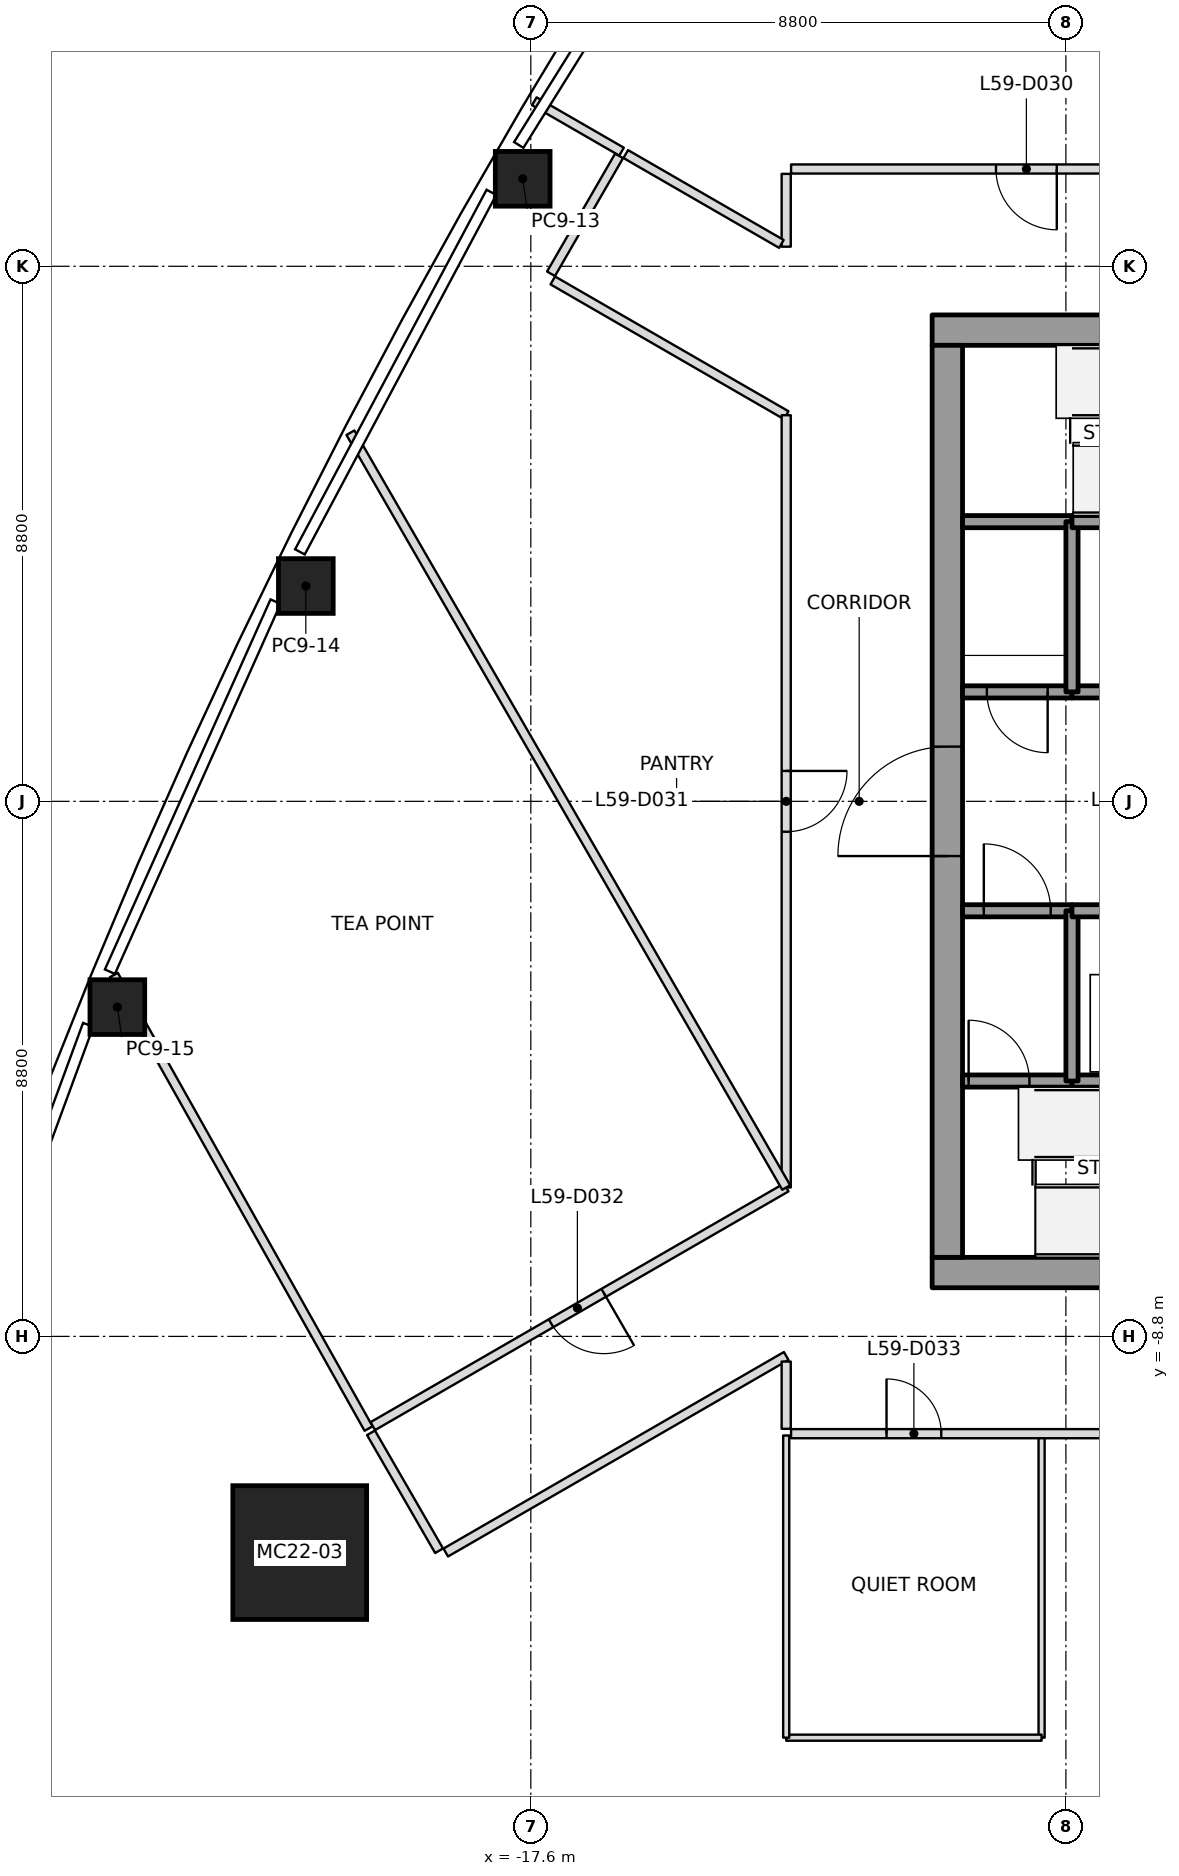
"""IFC4 building model, lengths in metres.
Left out: names, types, materials, properties, quantities, classifications, styles, units other than length and angle.
Written with IfcOpenShell. Run it as: python <this file> out.ifc"""

import sys

from ifc_helpers import new_model, si_unit, direction, frame, frame_2d, origin, origin_2d, place, context, subcontext, project, spatial, rectangle, extrude, element, fill, save


model = new_model("IFC4")
c1 = context("Model", 3, precision=1e-05, world=origin(), true_north=direction((0.0, 1.0)))
c2 = subcontext(c1, "Body", "Model", "MODEL_VIEW")
j1 = project(units=[si_unit("LENGTHUNIT", "METRE"), si_unit("PLANEANGLEUNIT", "RADIAN")], contexts=[c1])
p1 = place(None, origin())
s1 = spatial("IfcSite", under=j1, at=p1, CompositionType="ELEMENT")
p2 = place(p1, origin())
s2 = spatial("IfcBuilding", under=s1, at=p2, CompositionType="ELEMENT")
p3 = place(p2, frame((0.0, 0.0, 263.0)))
s3 = spatial("IfcBuildingStorey", under=s2, at=p3, CompositionType="ELEMENT", Elevation=263.0)
p4 = place(p3, frame((-21.4, -12.356, 0.0), z_axis=(0.027756693063, 0.016104982348, 0.999484965136), x_axis=(0.99961470877, -0.000447193351, -0.02775309042)))
e1 = element("IfcColumn", 1, at=p4, inside=s3, PredefinedType="COLUMN", context=c2, shape_type="SweptSolid", body=[
    extrude(rectangle(XDim=2.2, YDim=2.2, at=origin_2d()), origin(), (0.0, 0.0, 1.0), 4.002),
])
p5 = place(p3, frame((-17.734, 10.239, 0.0), z_axis=(0.009887052741, -0.005675900648, 0.999935013058), x_axis=(0.49997556095, 0.866039512773, -2.7732311e-05)))
e2 = element("IfcColumn", 2, at=p5, inside=s3, PredefinedType="COLUMN", context=c2, shape_type="SweptSolid", body=[
    extrude(rectangle(XDim=0.9, YDim=0.9, at=origin_2d()), origin(), (0.0, 0.0, 1.0), 4.0),
])
p6 = place(p3, frame((-21.3, 3.541, 0.0), z_axis=(0.014036674448, 0.002013957638, 0.999899452818), x_axis=(0.439491445478, 0.898211338571, -0.00797876017)))
e3 = element("IfcColumn", 3, at=p6, inside=s3, PredefinedType="COLUMN", context=c2, shape_type="SweptSolid", body=[
    extrude(rectangle(XDim=0.9, YDim=0.9, at=origin_2d()), origin(), (0.0, 0.0, 1.0), 4.0),
])
p7 = place(p3, frame((-24.4, -3.385, 0.0), z_axis=(0.017757540332, 0.01000768596, 0.999792236409), x_axis=(0.376945742216, 0.926097740454, -0.015965041529)))
e4 = element("IfcColumn", 4, at=p7, inside=s3, PredefinedType="COLUMN", context=c2, shape_type="SweptSolid", body=[
    extrude(rectangle(XDim=0.9, YDim=0.9, at=origin_2d()), origin(), (0.0, 0.0, 1.0), 4.001),
])
p8 = place(p3, frame((-11.0, -7.75, 0.0), z_axis=(0.0, 0.0, 1.0), x_axis=(1.0, 0.0, 0.0)))
e5 = element("IfcWall", 5, at=p8, inside=s3, PredefinedType="SHEAR", context=c2, shape_type="SweptSolid", body=[
    extrude(rectangle(XDim=22.0, YDim=0.5, at=frame_2d((11.0, 0.0))), origin(), (0.0, 0.0, 1.0), 4.0),
])
p9 = place(p8, frame((10.45, 0.0, 0.0)))
e6 = element("IfcOpeningElement", 6, at=p9, cuts=e5, PredefinedType="OPENING", context=c2, shape_type="SweptSolid", body=[
    extrude(rectangle(XDim=1.1, YDim=2.1, at=frame_2d((0.55, 1.05))), frame((0.0, 0.25, 0.0), z_axis=(0.0, -1.0, 0.0), x_axis=(1.0, 0.0, 0.0)), (0.0, 0.0, 1.0), 0.5),
])
p10 = place(p3, frame((-11.0, 7.75, 0.0), z_axis=(0.0, 0.0, 1.0), x_axis=(1.0, 0.0, 0.0)))
e7 = element("IfcWall", 7, at=p10, inside=s3, PredefinedType="SHEAR", context=c2, shape_type="SweptSolid", body=[
    extrude(rectangle(XDim=22.0, YDim=0.5, at=frame_2d((11.0, 0.0))), origin(), (0.0, 0.0, 1.0), 4.0),
])
p11 = place(p10, frame((10.45, 0.0, 0.0)))
e8 = element("IfcOpeningElement", 8, at=p11, cuts=e7, PredefinedType="OPENING", context=c2, shape_type="SweptSolid", body=[
    extrude(rectangle(XDim=1.1, YDim=2.1, at=frame_2d((0.55, 1.05))), frame((0.0, 0.25, 0.0), z_axis=(0.0, -1.0, 0.0), x_axis=(1.0, 0.0, 0.0)), (0.0, 0.0, 1.0), 0.5),
])
p12 = place(p3, frame((-10.75, -7.5, 0.0), z_axis=(0.0, 0.0, 1.0), x_axis=(0.0, 1.0, 0.0)))
e9 = element("IfcWall", 9, at=p12, inside=s3, PredefinedType="SHEAR", context=c2, shape_type="SweptSolid", body=[
    extrude(rectangle(XDim=15.0, YDim=0.5, at=frame_2d((7.5, 0.0))), origin(), (0.0, 0.0, 1.0), 4.0),
])
p13 = place(p12, frame((6.6, 0.0, 0.0)))
e10 = element("IfcOpeningElement", 10, at=p13, cuts=e9, PredefinedType="OPENING", context=c2, shape_type="SweptSolid", body=[
    extrude(rectangle(XDim=1.8, YDim=2.1, at=frame_2d((0.9, 1.05))), frame((0.0, 0.25, 0.0), z_axis=(0.0, -1.0, 0.0), x_axis=(1.0, 0.0, 0.0)), (0.0, 0.0, 1.0), 0.5),
])
p14 = place(p3, frame((-10.5, -4.6, 0.0), z_axis=(0.0, 0.0, 1.0), x_axis=(1.0, 0.0, 0.0)))
e11 = element("IfcWall", 11, at=p14, inside=s3, PredefinedType="SOLIDWALL", context=c2, shape_type="SweptSolid", body=[
    extrude(rectangle(XDim=1.8, YDim=0.2, at=frame_2d((0.9, 0.0))), origin(), (0.0, 0.0, 1.0), 3.85),
])
p15 = place(p14, frame((0.1, 0.0, 0.0)))
e12 = element("IfcOpeningElement", 12, at=p15, cuts=e11, PredefinedType="OPENING", context=c2, shape_type="SweptSolid", body=[
    extrude(rectangle(XDim=1.0, YDim=2.1, at=frame_2d((0.5, 1.05))), frame((0.0, 0.1, 0.0), z_axis=(0.0, -1.0, 0.0), x_axis=(1.0, 0.0, 0.0)), (0.0, 0.0, 1.0), 0.2),
])
p16 = place(p3, frame((-10.5, -1.8, 0.0), z_axis=(0.0, 0.0, 1.0), x_axis=(1.0, 0.0, 0.0)))
e13 = element("IfcWall", 13, at=p16, inside=s3, PredefinedType="SOLIDWALL", context=c2, shape_type="SweptSolid", body=[
    extrude(rectangle(XDim=1.8, YDim=0.2, at=frame_2d((0.9, 0.0))), origin(), (0.0, 0.0, 1.0), 3.85),
])
p17 = place(p16, frame((0.35, 0.0, 0.0)))
e14 = element("IfcOpeningElement", 14, at=p17, cuts=e13, PredefinedType="OPENING", context=c2, shape_type="SweptSolid", body=[
    extrude(rectangle(XDim=1.1, YDim=2.1, at=frame_2d((0.55, 1.05))), frame((0.0, 0.1, 0.0), z_axis=(0.0, -1.0, 0.0), x_axis=(1.0, 0.0, 0.0)), (0.0, 0.0, 1.0), 0.2),
])
p18 = place(p3, frame((-8.7, 1.8, 0.0), z_axis=(0.0, 0.0, 1.0), x_axis=(-1.0, 0.0, 0.0)))
e15 = element("IfcWall", 15, at=p18, inside=s3, PredefinedType="SOLIDWALL", context=c2, shape_type="SweptSolid", body=[
    extrude(rectangle(XDim=1.8, YDim=0.2, at=frame_2d((0.9, 0.0))), origin(), (0.0, 0.0, 1.0), 3.85),
])
p19 = place(p18, frame((0.4, 0.0, 0.0)))
e16 = element("IfcOpeningElement", 16, at=p19, cuts=e15, PredefinedType="OPENING", context=c2, shape_type="SweptSolid", body=[
    extrude(rectangle(XDim=1.0, YDim=2.1, at=frame_2d((0.5, 1.05))), frame((0.0, 0.1, 0.0), z_axis=(0.0, -1.0, 0.0), x_axis=(1.0, 0.0, 0.0)), (0.0, 0.0, 1.0), 0.2),
])
p20 = place(p3, frame((-8.7, 4.6, 0.0), z_axis=(0.0, 0.0, 1.0), x_axis=(-1.0, 0.0, 0.0)))
e17 = element("IfcWall", 17, at=p20, inside=s3, PredefinedType="SOLIDWALL", context=c2, shape_type="SweptSolid", body=[
    extrude(rectangle(XDim=1.8, YDim=0.2, at=frame_2d((0.9, 0.0))), origin(), (0.0, 0.0, 1.0), 3.85),
])
p21 = place(p3, frame((-8.7, -4.6, 0.0), z_axis=(0.0, 0.0, 1.0), x_axis=(1.0, 0.0, 0.0)))
e18 = element("IfcWall", 18, at=p21, inside=s3, PredefinedType="SOLIDWALL", context=c2, shape_type="SweptSolid", body=[
    extrude(rectangle(XDim=2.6, YDim=0.2, at=frame_2d((1.3, 0.0))), origin(), (0.0, 0.0, 1.0), 3.85),
])
p22 = place(p3, frame((-8.7, -4.6, 0.0), z_axis=(0.0, 0.0, 1.0), x_axis=(0.0, 1.0, 0.0)))
e19 = element("IfcWall", 19, at=p22, inside=s3, PredefinedType="SOLIDWALL", context=c2, shape_type="SweptSolid", body=[
    extrude(rectangle(XDim=2.8, YDim=0.2, at=frame_2d((1.4, 0.0))), origin(), (0.0, 0.0, 1.0), 3.85),
])
p23 = place(p3, frame((-8.7, -1.8, 0.0), z_axis=(0.0, 0.0, 1.0), x_axis=(1.0, 0.0, 0.0)))
e20 = element("IfcWall", 20, at=p23, inside=s3, PredefinedType="SOLIDWALL", context=c2, shape_type="SweptSolid", body=[
    extrude(rectangle(XDim=2.6, YDim=0.2, at=frame_2d((1.3, 0.0))), origin(), (0.0, 0.0, 1.0), 3.85),
])
p24 = place(p23, frame((0.75, 0.0, 0.0)))
e21 = element("IfcOpeningElement", 21, at=p24, cuts=e20, PredefinedType="OPENING", context=c2, shape_type="SweptSolid", body=[
    extrude(rectangle(XDim=1.1, YDim=2.1, at=frame_2d((0.55, 1.05))), frame((0.0, 0.1, 0.0), z_axis=(0.0, -1.0, 0.0), x_axis=(1.0, 0.0, 0.0)), (0.0, 0.0, 1.0), 0.2),
])
p25 = place(p3, frame((-8.7, 1.8, 0.0), z_axis=(0.0, 0.0, 1.0), x_axis=(1.0, 0.0, 0.0)))
e22 = element("IfcWall", 22, at=p25, inside=s3, PredefinedType="SOLIDWALL", context=c2, shape_type="SweptSolid", body=[
    extrude(rectangle(XDim=5.2, YDim=0.2, at=frame_2d((2.6, 0.0))), origin(), (0.0, 0.0, 1.0), 3.85),
])
p26 = place(p25, frame((2.15, 0.0, 0.0)))
e23 = element("IfcOpeningElement", 23, at=p26, cuts=e22, PredefinedType="OPENING", context=c2, shape_type="SweptSolid", body=[
    extrude(rectangle(XDim=0.9, YDim=2.1, at=frame_2d((0.45, 1.05))), frame((0.0, 0.1, 0.0), z_axis=(0.0, -1.0, 0.0), x_axis=(1.0, 0.0, 0.0)), (0.0, 0.0, 1.0), 0.2),
])
p27 = place(p3, frame((-8.7, 4.6, 0.0), z_axis=(0.0, 0.0, 1.0), x_axis=(0.0, -1.0, 0.0)))
e24 = element("IfcWall", 24, at=p27, inside=s3, PredefinedType="SOLIDWALL", context=c2, shape_type="SweptSolid", body=[
    extrude(rectangle(XDim=2.8, YDim=0.2, at=frame_2d((1.4, 0.0))), origin(), (0.0, 0.0, 1.0), 3.85),
])
p28 = place(p3, frame((-4.3, 4.6, 0.0), z_axis=(0.0, 0.0, 1.0), x_axis=(-1.0, 0.0, 0.0)))
e25 = element("IfcWall", 25, at=p28, inside=s3, PredefinedType="SOLIDWALL", context=c2, shape_type="SweptSolid", body=[
    extrude(rectangle(XDim=4.4, YDim=0.2, at=frame_2d((2.2, 0.0))), origin(), (0.0, 0.0, 1.0), 3.85),
])
p29 = place(p3, frame((-20.268, -10.316, 0.0), z_axis=(0.0, 0.0, 1.0), x_axis=(-0.489669112998, 0.871908343678, 0.0)))
e26 = element("IfcWall", 26, at=p29, inside=s3, PredefinedType="PARTITIONING", context=c2, shape_type="SweptSolid", body=[
    extrude(rectangle(XDim=8.556, YDim=0.15, at=frame_2d((4.278, 0.0))), origin(), (0.0, 0.0, 1.0), 3.443),
])
p30 = place(p3, frame((-13.4, -6.351, 0.0), z_axis=(0.0, 0.0, 1.0), x_axis=(-0.500007991186, 0.866020790022, 0.0)))
e27 = element("IfcWall", 27, at=p30, inside=s3, PredefinedType="PARTITIONING", context=c2, shape_type="SweptSolid", body=[
    extrude(rectangle(XDim=14.334, YDim=0.15, at=frame_2d((7.167, 0.0))), origin(), (0.0, 0.0, 1.0), 3.234),
])
p31 = place(p3, frame((-16.108, 10.686, 0.0), z_axis=(0.0, 0.0, 1.0), x_axis=(-0.866057962423, 0.499943602543, 0.0)))
e28 = element("IfcWall", 28, at=p31, inside=s3, PredefinedType="PARTITIONING", context=c2, shape_type="SweptSolid", body=[
    extrude(rectangle(XDim=1.656, YDim=0.15, at=frame_2d((0.828, 0.0))), origin(), (0.0, 0.0, 1.0), 3.234),
])
p32 = place(p3, frame((-20.229, -10.385, 0.0), z_axis=(0.0, 0.0, 1.0), x_axis=(0.500030632641, -0.866007717299, 0.0)))
e29 = element("IfcWall", 29, at=p32, inside=s3, PredefinedType="PARTITIONING", context=c2, shape_type="SweptSolid", body=[
    extrude(rectangle(XDim=2.24, YDim=0.15, at=frame_2d((1.12, 0.0))), origin(), (0.0, 0.0, 1.0), 3.233),
])
p33 = place(p3, frame((-13.4, -6.351, 0.0), z_axis=(0.0, 0.0, 1.0), x_axis=(-0.866028164062, -0.499995219029, 0.0)))
e30 = element("IfcWall", 30, at=p33, inside=s3, PredefinedType="PARTITIONING", context=c2, shape_type="SweptSolid", body=[
    extrude(rectangle(XDim=7.851, YDim=0.15, at=frame_2d((3.926, 0.0))), origin(), (0.0, 0.0, 1.0), 3.317),
])
p34 = place(p33, frame((3.466, 0.0, 0.0)))
e31 = element("IfcOpeningElement", 31, at=p34, cuts=e30, PredefinedType="OPENING", context=c2, shape_type="SweptSolid", body=[
    extrude(rectangle(XDim=1.0, YDim=2.1, at=frame_2d((0.5, 1.05))), frame((0.0, 0.075, 0.0), z_axis=(0.0, -1.0, 0.0), x_axis=(1.0, 0.0, 0.0)), (0.0, 0.0, 1.0), 0.15),
])
p35 = place(p3, frame((-18.999, -12.355, 0.0), z_axis=(0.0, 0.0, 1.0), x_axis=(0.866024603775, 0.500001385654, 0.0)))
e32 = element("IfcWall", 32, at=p35, inside=s3, PredefinedType="PARTITIONING", context=c2, shape_type="SweptSolid", body=[
    extrude(rectangle(XDim=6.465, YDim=0.15, at=frame_2d((3.233, 0.0))), origin(), (0.0, 0.0, 1.0), 3.233),
])
p36 = place(p3, frame((-13.4, -9.214, 0.0), z_axis=(0.0, 0.0, 1.0), x_axis=(0.0, -1.0, 0.0)))
e33 = element("IfcWall", 33, at=p36, inside=s3, PredefinedType="PARTITIONING", context=c2, shape_type="SweptSolid", body=[
    extrude(rectangle(XDim=1.106, YDim=0.15, at=frame_2d((0.553, 0.0))), origin(), (0.0, 0.0, 1.0), 3.233),
])
p37 = place(p3, frame((-16.148, 10.616, 0.0), z_axis=(0.0, 0.0, 1.0), x_axis=(-0.500077830873, -0.865980463445, 0.0)))
e34 = element("IfcWall", 34, at=p37, inside=s3, PredefinedType="PARTITIONING", context=c2, shape_type="SweptSolid", body=[
    extrude(rectangle(XDim=2.24, YDim=0.15, at=frame_2d((1.12, 0.0))), origin(), (0.0, 0.0, 1.0), 3.45),
])
p38 = place(p3, frame((-17.239, 8.567, 0.0), z_axis=(0.0, 0.0, 1.0), x_axis=(0.866031500321, -0.49998944034, 0.0)))
e35 = element("IfcWall", 35, at=p38, inside=s3, PredefinedType="PARTITIONING", context=c2, shape_type="SweptSolid", body=[
    extrude(rectangle(XDim=4.433, YDim=0.15, at=frame_2d((2.216, 0.0))), origin(), (0.0, 0.0, 1.0), 3.45),
])
p39 = place(p3, frame((-13.4, 6.351, 0.0), z_axis=(0.0, 0.0, 1.0), x_axis=(0.0, -1.0, 0.0)))
e36 = element("IfcWall", 36, at=p39, inside=s3, PredefinedType="PARTITIONING", context=c2, shape_type="SweptSolid", body=[
    extrude(rectangle(XDim=12.702, YDim=0.15, at=frame_2d((6.351, 0.0))), origin(), (0.0, 0.0, 1.0), 3.317),
])
p40 = place(p39, frame((5.851, 0.0, 0.0)))
e37 = element("IfcOpeningElement", 37, at=p40, cuts=e36, PredefinedType="OPENING", context=c2, shape_type="SweptSolid", body=[
    extrude(rectangle(XDim=1.0, YDim=2.1, at=frame_2d((0.5, 1.05))), frame((0.0, 0.075, 0.0), z_axis=(0.0, -1.0, 0.0), x_axis=(1.0, 0.0, 0.0)), (0.0, 0.0, 1.0), 0.15),
])
p41 = place(p3, frame((-13.4, 10.32, 0.0), z_axis=(0.0, 0.0, 1.0), x_axis=(0.0, -1.0, 0.0)))
e38 = element("IfcWall", 38, at=p41, inside=s3, PredefinedType="PARTITIONING", context=c2, shape_type="SweptSolid", body=[
    extrude(rectangle(XDim=1.198, YDim=0.15, at=frame_2d((0.599, 0.0))), origin(), (0.0, 0.0, 1.0), 3.45),
])
p42 = place(p3, frame((-13.479, 9.168, 0.0), z_axis=(0.0, 0.0, 1.0), x_axis=(-0.866059033742, 0.499941746681, 0.0)))
e39 = element("IfcWall", 39, at=p42, inside=s3, PredefinedType="PARTITIONING", context=c2, shape_type="SweptSolid", body=[
    extrude(rectangle(XDim=2.955, YDim=0.15, at=frame_2d((1.478, 0.0))), origin(), (0.0, 0.0, 1.0), 3.45),
])
p43 = place(p3, frame((-13.32, -10.4, 0.0), z_axis=(0.0, 0.0, 1.0), x_axis=(1.0, 0.0, 0.0)))
e40 = element("IfcWall", 40, at=p43, inside=s3, PredefinedType="PARTITIONING", context=c2, shape_type="SweptSolid", body=[
    extrude(rectangle(XDim=12.12, YDim=0.15, at=frame_2d((6.06, 0.0))), origin(), (0.0, 0.0, 1.0), 3.317),
])
p44 = place(p43, frame((1.57, 0.0, 0.0)))
e41 = element("IfcOpeningElement", 41, at=p44, cuts=e40, PredefinedType="OPENING", context=c2, shape_type="SweptSolid", body=[
    extrude(rectangle(XDim=0.9, YDim=2.1, at=frame_2d((0.45, 1.05))), frame((0.0, 0.075, 0.0), z_axis=(0.0, -1.0, 0.0), x_axis=(1.0, 0.0, 0.0)), (0.0, 0.0, 1.0), 0.15),
])
p45 = place(p43, frame((7.67, 0.0, 0.0)))
e42 = element("IfcOpeningElement", 42, at=p45, cuts=e40, PredefinedType="OPENING", context=c2, shape_type="SweptSolid", body=[
    extrude(rectangle(XDim=1.0, YDim=2.1, at=frame_2d((0.5, 1.05))), frame((0.0, 0.075, 0.0), z_axis=(0.0, -1.0, 0.0), x_axis=(1.0, 0.0, 0.0)), (0.0, 0.0, 1.0), 0.15),
])
p46 = place(p3, frame((-4.48, 10.4, 0.0), z_axis=(0.0, 0.0, 1.0), x_axis=(-1.0, 0.0, 0.0)))
e43 = element("IfcWall", 43, at=p46, inside=s3, PredefinedType="PARTITIONING", context=c2, shape_type="SweptSolid", body=[
    extrude(rectangle(XDim=8.84, YDim=0.15, at=frame_2d((4.42, 0.0))), origin(), (0.0, 0.0, 1.0), 3.443),
])
p47 = place(p46, frame((4.47, 0.0, 0.0)))
e44 = element("IfcOpeningElement", 44, at=p47, cuts=e43, PredefinedType="OPENING", context=c2, shape_type="SweptSolid", body=[
    extrude(rectangle(XDim=1.0, YDim=2.1, at=frame_2d((0.5, 1.05))), frame((0.0, 0.075, 0.0), z_axis=(0.0, -1.0, 0.0), x_axis=(1.0, 0.0, 0.0)), (0.0, 0.0, 1.0), 0.15),
])
p48 = place(p3, frame((-9.2, -10.43, 0.0), z_axis=(0.0, 0.0, 1.0), x_axis=(0.0, -1.0, 0.0)))
e45 = element("IfcWall", 45, at=p48, inside=s3, PredefinedType="PARTITIONING", context=c2, shape_type="SweptSolid", body=[
    extrude(rectangle(XDim=4.97, YDim=0.1, at=frame_2d((2.485, 0.0))), origin(), (0.0, 0.0, 1.0), 3.45),
])
p49 = place(p3, frame((-9.2, -15.4, 0.0), z_axis=(0.0, 0.0, 1.0), x_axis=(-1.0, 0.0, 0.0)))
e46 = element("IfcWall", 46, at=p49, inside=s3, PredefinedType="PARTITIONING", context=c2, shape_type="SweptSolid", body=[
    extrude(rectangle(XDim=4.2, YDim=0.1, at=frame_2d((2.1, 0.0))), origin(), (0.0, 0.0, 1.0), 3.393),
])
p50 = place(p3, frame((-13.4, -15.4, 0.0), z_axis=(0.0, 0.0, 1.0), x_axis=(0.0, 1.0, 0.0)))
e47 = element("IfcWall", 47, at=p50, inside=s3, PredefinedType="PARTITIONING", context=c2, shape_type="SweptSolid", body=[
    extrude(rectangle(XDim=4.97, YDim=0.1, at=frame_2d((2.485, 0.0))), origin(), (0.0, 0.0, 1.0), 3.45),
])
p51 = place(p47, origin())
e48 = element("IfcDoor", 48, at=p51, inside=s3, OperationType="SINGLE_SWING_RIGHT", PredefinedType="DOOR", context=c2, shape_type="SweptSolid", body=[
    extrude(rectangle(XDim=1.0, YDim=2.1, at=frame_2d((0.5, 1.05))), frame((0.0, 0.025, 0.0), z_axis=(0.0, -1.0, 0.0), x_axis=(1.0, 0.0, 0.0)), (0.0, 0.0, 1.0), 0.05),
])
fill(e44, e48)
p52 = place(p40, origin())
e49 = element("IfcDoor", 49, at=p52, inside=s3, OperationType="SINGLE_SWING_LEFT", PredefinedType="DOOR", context=c2, shape_type="SweptSolid", body=[
    extrude(rectangle(XDim=1.0, YDim=2.1, at=frame_2d((0.5, 1.05))), frame((0.0, 0.025, 0.0), z_axis=(0.0, -1.0, 0.0), x_axis=(1.0, 0.0, 0.0)), (0.0, 0.0, 1.0), 0.05),
])
fill(e37, e49)
p53 = place(p34, origin())
e50 = element("IfcDoor", 50, at=p53, inside=s3, OperationType="SINGLE_SWING_RIGHT", PredefinedType="DOOR", context=c2, shape_type="SweptSolid", body=[
    extrude(rectangle(XDim=1.0, YDim=2.1, at=frame_2d((0.5, 1.05))), frame((0.0, 0.025, 0.0), z_axis=(0.0, -1.0, 0.0), x_axis=(1.0, 0.0, 0.0)), (0.0, 0.0, 1.0), 0.05),
])
fill(e31, e50)
p54 = place(p44, origin())
e51 = element("IfcDoor", 51, at=p54, inside=s3, OperationType="SINGLE_SWING_LEFT", PredefinedType="DOOR", context=c2, shape_type="SweptSolid", body=[
    extrude(rectangle(XDim=0.9, YDim=2.1, at=frame_2d((0.45, 1.05))), frame((0.0, 0.025, 0.0), z_axis=(0.0, -1.0, 0.0), x_axis=(1.0, 0.0, 0.0)), (0.0, 0.0, 1.0), 0.05),
])
fill(e41, e51)
p55 = place(p17, origin())
e52 = element("IfcDoor", 52, at=p55, inside=s3, OperationType="SINGLE_SWING_LEFT", PredefinedType="DOOR", context=c2, shape_type="SweptSolid", body=[
    extrude(rectangle(XDim=1.1, YDim=2.1, at=frame_2d((0.55, 1.05))), frame((0.0, 0.025, 0.0), z_axis=(0.0, -1.0, 0.0), x_axis=(1.0, 0.0, 0.0)), (0.0, 0.0, 1.0), 0.05),
])
fill(e14, e52)
p56 = place(p19, origin())
e53 = element("IfcDoor", 53, at=p56, inside=s3, OperationType="SINGLE_SWING_LEFT", PredefinedType="DOOR", context=c2, shape_type="SweptSolid", body=[
    extrude(rectangle(XDim=1.0, YDim=2.1, at=frame_2d((0.5, 1.05))), frame((0.0, 0.025, 0.0), z_axis=(0.0, -1.0, 0.0), x_axis=(1.0, 0.0, 0.0)), (0.0, 0.0, 1.0), 0.05),
])
fill(e16, e53)
p57 = place(p15, origin())
e54 = element("IfcDoor", 54, at=p57, inside=s3, OperationType="SINGLE_SWING_LEFT", PredefinedType="DOOR", context=c2, shape_type="SweptSolid", body=[
    extrude(rectangle(XDim=1.0, YDim=2.1, at=frame_2d((0.5, 1.05))), frame((0.0, 0.025, 0.0), z_axis=(0.0, -1.0, 0.0), x_axis=(1.0, 0.0, 0.0)), (0.0, 0.0, 1.0), 0.05),
])
fill(e12, e54)
p58 = place(p13, origin())
e55 = element("IfcDoor", 55, at=p58, inside=s3, OperationType="DOUBLE_DOOR_SINGLE_SWING", PredefinedType="DOOR", context=c2, shape_type="SweptSolid", body=[
    extrude(rectangle(XDim=1.8, YDim=2.1, at=frame_2d((0.9, 1.05))), frame((0.0, 0.025, 0.0), z_axis=(0.0, -1.0, 0.0), x_axis=(1.0, 0.0, 0.0)), (0.0, 0.0, 1.0), 0.05),
])
fill(e10, e55)
save(model, sys.argv[1])
